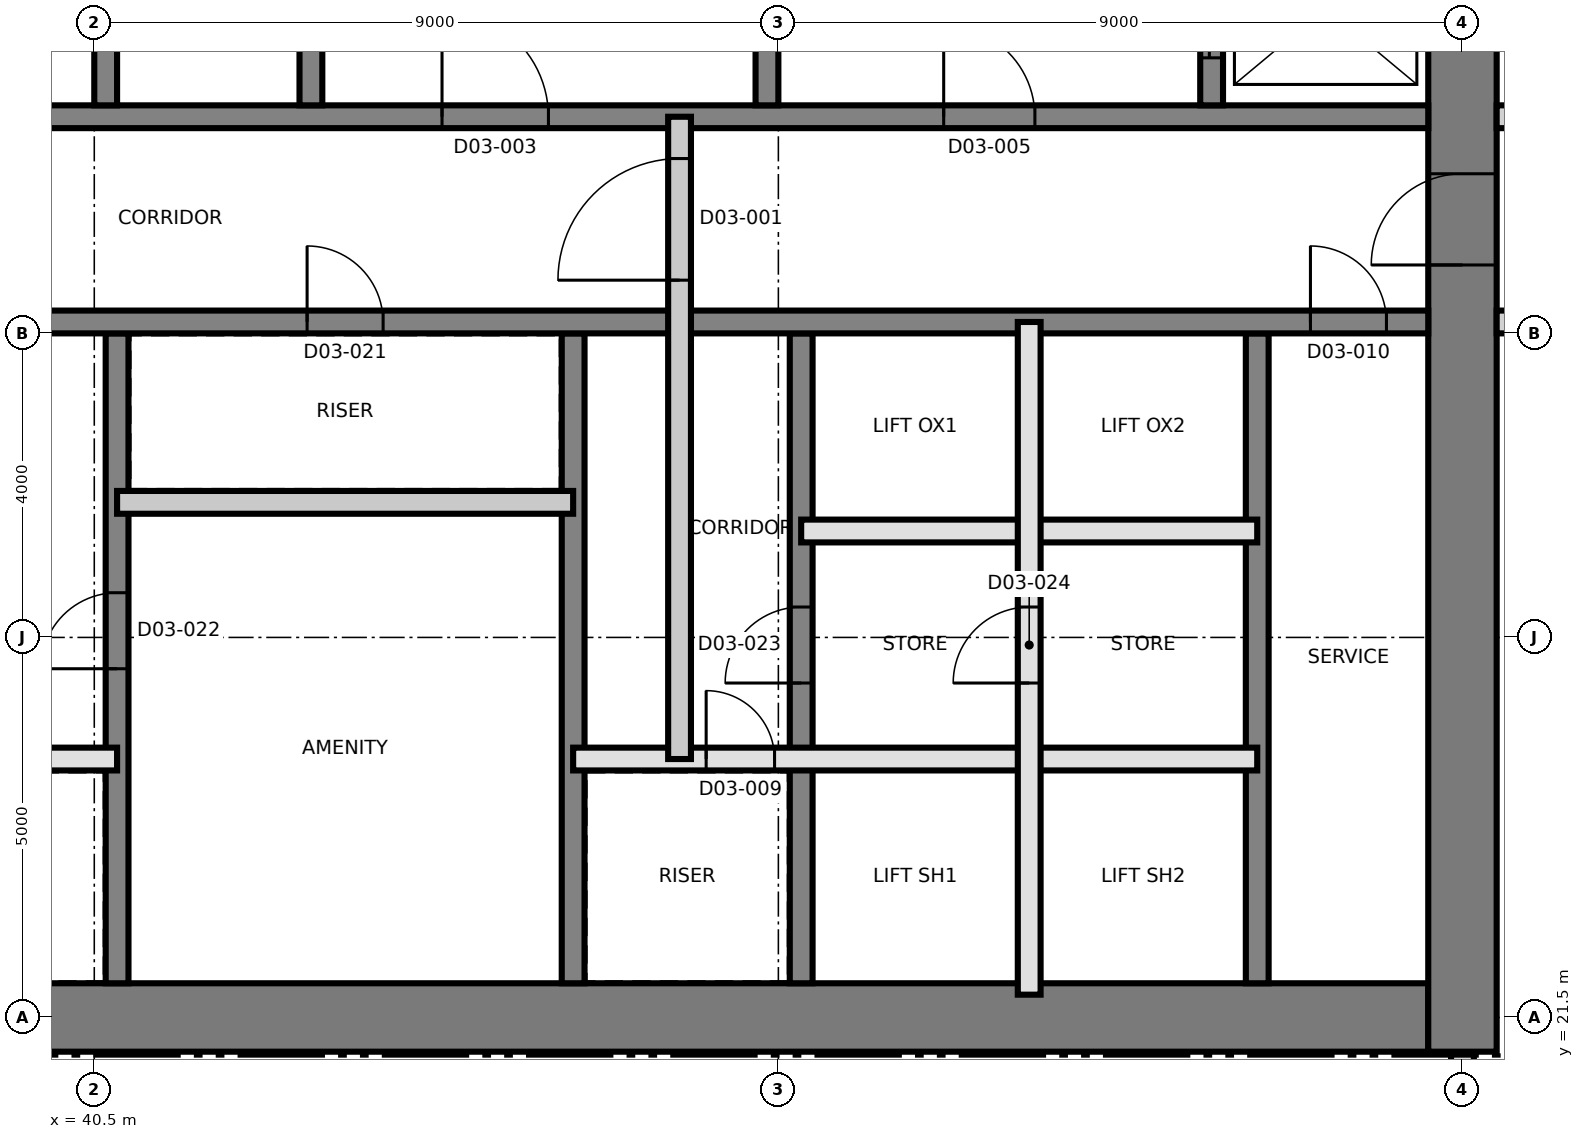
"""IFC4 building model, lengths in metres.
Left out: names, types, materials, properties, quantities, classifications, styles, units other than length and angle.
Written with IfcOpenShell. Run it as: python <this file> out.ifc"""

import sys

from ifc_helpers import new_model, si_unit, direction, frame, frame_2d, origin, place, context, subcontext, project, spatial, rectangle, extrude, element, fill, save


model = new_model("IFC4")
c1 = context("Model", 3, precision=1e-05, world=origin(), true_north=direction((0.0, 1.0)))
c2 = subcontext(c1, "Body", "Model", "MODEL_VIEW")
j1 = project(units=[si_unit("LENGTHUNIT", "METRE"), si_unit("PLANEANGLEUNIT", "RADIAN")], contexts=[c1])
p1 = place(None, origin())
s1 = spatial("IfcSite", under=j1, at=p1, CompositionType="ELEMENT")
p2 = place(p1, origin())
s2 = spatial("IfcBuilding", under=s1, at=p2, CompositionType="ELEMENT")
p3 = place(p2, frame((0.0, 0.0, 55.7)))
s3 = spatial("IfcBuildingStorey", under=s2, at=p3, CompositionType="ELEMENT", Elevation=55.7)
p4 = place(p3, frame((31.05, 21.5, 0.0), z_axis=(0.0, 0.0, 1.0), x_axis=(1.0, 0.0, 0.0)))
e1 = element("IfcWall", 1, at=p4, inside=s3, PredefinedType="SHEAR", context=c2, shape_type="SweptSolid", body=[
    extrude(rectangle(XDim=27.0, YDim=0.9, at=frame_2d((13.5, 0.0))), origin(), (0.0, 0.0, 1.0), 3.7),
])
p5 = place(p3, frame((58.5, 21.05, 0.0), z_axis=(0.0, 0.0, 1.0), x_axis=(0.0, 1.0, 0.0)))
e2 = element("IfcWall", 2, at=p5, inside=s3, PredefinedType="SHEAR", context=c2, shape_type="SweptSolid", body=[
    extrude(rectangle(XDim=18.9, YDim=0.9, at=frame_2d((9.45, 0.0))), origin(), (0.0, 0.0, 1.0), 3.7),
])
p6 = place(p5, frame((10.35, 0.0, 0.0)))
e3 = element("IfcOpeningElement", 3, at=p6, cuts=e2, PredefinedType="OPENING", context=c2, shape_type="SweptSolid", body=[
    extrude(rectangle(XDim=1.2, YDim=2.1, at=frame_2d((0.6, 1.05))), frame((0.0, 0.46, 0.0), z_axis=(0.0, -1.0, 0.0), x_axis=(1.0, 0.0, 0.0)), (0.0, 0.0, 1.0), 0.92),
])
p7 = place(p3, frame((40.8, 21.95, 0.0), z_axis=(0.0, 0.0, 1.0), x_axis=(0.0, 1.0, 0.0)))
e4 = element("IfcWall", 4, at=p7, inside=s3, PredefinedType="SHEAR", context=c2, shape_type="SweptSolid", body=[
    extrude(rectangle(XDim=8.55, YDim=0.3, at=frame_2d((4.275, 0.0))), origin(), (0.0, 0.0, 1.0), 3.7),
])
p8 = place(p7, frame((4.138, 0.0, 0.0)))
e5 = element("IfcOpeningElement", 5, at=p8, cuts=e4, PredefinedType="OPENING", context=c2, shape_type="SweptSolid", body=[
    extrude(rectangle(XDim=1.0, YDim=2.1, at=frame_2d((0.5, 1.05))), frame((0.0, 0.16, 0.0), z_axis=(0.0, -1.0, 0.0), x_axis=(1.0, 0.0, 0.0)), (0.0, 0.0, 1.0), 0.32),
])
p9 = place(p3, frame((46.8, 21.95, 0.0), z_axis=(0.0, 0.0, 1.0), x_axis=(0.0, 1.0, 0.0)))
e6 = element("IfcWall", 6, at=p9, inside=s3, PredefinedType="SHEAR", context=c2, shape_type="SweptSolid", body=[
    extrude(rectangle(XDim=8.55, YDim=0.3, at=frame_2d((4.275, 0.0))), origin(), (0.0, 0.0, 1.0), 3.7),
])
p10 = place(p3, frame((49.8, 21.95, 0.0), z_axis=(0.0, 0.0, 1.0), x_axis=(0.0, 1.0, 0.0)))
e7 = element("IfcWall", 7, at=p10, inside=s3, PredefinedType="SHEAR", context=c2, shape_type="SweptSolid", body=[
    extrude(rectangle(XDim=8.55, YDim=0.3, at=frame_2d((4.275, 0.0))), origin(), (0.0, 0.0, 1.0), 3.7),
])
p11 = place(p10, frame((3.95, 0.0, 0.0)))
e8 = element("IfcOpeningElement", 8, at=p11, cuts=e7, PredefinedType="OPENING", context=c2, shape_type="SweptSolid", body=[
    extrude(rectangle(XDim=1.0, YDim=2.1, at=frame_2d((0.5, 1.05))), frame((0.0, 0.16, 0.0), z_axis=(0.0, -1.0, 0.0), x_axis=(1.0, 0.0, 0.0)), (0.0, 0.0, 1.0), 0.32),
])
p12 = place(p3, frame((55.8, 21.95, 0.0), z_axis=(0.0, 0.0, 1.0), x_axis=(0.0, 1.0, 0.0)))
e9 = element("IfcWall", 9, at=p12, inside=s3, PredefinedType="SHEAR", context=c2, shape_type="SweptSolid", body=[
    extrude(rectangle(XDim=8.55, YDim=0.3, at=frame_2d((4.275, 0.0))), origin(), (0.0, 0.0, 1.0), 3.7),
])
p13 = place(p3, frame((31.95, 30.65, 0.0), z_axis=(0.0, 0.0, 1.0), x_axis=(1.0, 0.0, 0.0)))
e10 = element("IfcWall", 10, at=p13, inside=s3, PredefinedType="SHEAR", context=c2, shape_type="SweptSolid", body=[
    extrude(rectangle(XDim=26.1, YDim=0.3, at=frame_2d((13.05, 0.0))), origin(), (0.0, 0.0, 1.0), 3.7),
])
p14 = place(p13, frame((24.55, 0.0, 0.0)))
e11 = element("IfcOpeningElement", 11, at=p14, cuts=e10, PredefinedType="OPENING", context=c2, shape_type="SweptSolid", body=[
    extrude(rectangle(XDim=1.0, YDim=2.1, at=frame_2d((0.5, 1.05))), frame((0.0, 0.16, 0.0), z_axis=(0.0, -1.0, 0.0), x_axis=(1.0, 0.0, 0.0)), (0.0, 0.0, 1.0), 0.32),
])
p15 = place(p13, frame((11.35, 0.0, 0.0)))
e12 = element("IfcOpeningElement", 12, at=p15, cuts=e10, PredefinedType="OPENING", context=c2, shape_type="SweptSolid", body=[
    extrude(rectangle(XDim=1.0, YDim=2.1, at=frame_2d((0.5, 1.05))), frame((0.0, 0.16, 0.0), z_axis=(0.0, -1.0, 0.0), x_axis=(1.0, 0.0, 0.0)), (0.0, 0.0, 1.0), 0.32),
])
p16 = place(p3, frame((31.95, 33.35, 0.0), z_axis=(0.0, 0.0, 1.0), x_axis=(1.0, 0.0, 0.0)))
e13 = element("IfcWall", 13, at=p16, inside=s3, PredefinedType="SHEAR", context=c2, shape_type="SweptSolid", body=[
    extrude(rectangle(XDim=26.1, YDim=0.3, at=frame_2d((13.05, 0.0))), origin(), (0.0, 0.0, 1.0), 3.7),
])
p17 = place(p16, frame((13.125, 0.0, 0.0)))
e14 = element("IfcOpeningElement", 14, at=p17, cuts=e13, PredefinedType="OPENING", context=c2, shape_type="SweptSolid", body=[
    extrude(rectangle(XDim=1.4, YDim=2.1, at=frame_2d((0.7, 1.05))), frame((0.0, 0.16, 0.0), z_axis=(0.0, -1.0, 0.0), x_axis=(1.0, 0.0, 0.0)), (0.0, 0.0, 1.0), 0.32),
])
p18 = place(p16, frame((5.175, 0.0, 0.0)))
e15 = element("IfcOpeningElement", 15, at=p18, cuts=e13, PredefinedType="OPENING", context=c2, shape_type="SweptSolid", body=[
    extrude(rectangle(XDim=1.2, YDim=2.1, at=frame_2d((0.6, 1.05))), frame((0.0, 0.16, 0.0), z_axis=(0.0, -1.0, 0.0), x_axis=(1.0, 0.0, 0.0)), (0.0, 0.0, 1.0), 0.32),
])
p19 = place(p16, frame((19.725, 0.0, 0.0)))
e16 = element("IfcOpeningElement", 16, at=p19, cuts=e13, PredefinedType="OPENING", context=c2, shape_type="SweptSolid", body=[
    extrude(rectangle(XDim=1.2, YDim=2.1, at=frame_2d((0.6, 1.05))), frame((0.0, 0.16, 0.0), z_axis=(0.0, -1.0, 0.0), x_axis=(1.0, 0.0, 0.0)), (0.0, 0.0, 1.0), 0.32),
])
for number, where, z_axis, x_axis in (
    (17, (40.65, 33.5, 0.0), (0.0, 0.0, 1.0), (0.0, 1.0, 0.0)),
    (18, (43.35, 33.5, 0.0), (0.0, 0.0, 1.0), (0.0, 1.0, 0.0)),
    (19, (49.35, 33.5, 0.0), (0.0, 0.0, 1.0), (0.0, 1.0, 0.0)),
):
    element("IfcWall", number, at=place(p3, frame(where, z_axis=z_axis, x_axis=x_axis)), inside=s3, PredefinedType="SHEAR", context=c2, shape_type="SweptSolid", body=[
        extrude(rectangle(XDim=5.55, YDim=0.3, at=frame_2d((2.775, 0.0))), origin(), (0.0, 0.0, 1.0), 3.7),
    ])
p20 = place(p3, frame((55.2, 33.5, 0.0), z_axis=(0.0, 0.0, 1.0), x_axis=(0.0, 1.0, 0.0)))
e20 = element("IfcWall", 20, at=p20, inside=s3, PredefinedType="SHEAR", context=c2, shape_type="SweptSolid", body=[
    extrude(rectangle(XDim=2.55, YDim=0.3, at=frame_2d((1.275, 0.0))), origin(), (0.0, 0.0, 1.0), 3.7),
])
p21 = place(p20, frame((0.625, 0.0, 0.0)))
e21 = element("IfcOpeningElement", 21, at=p21, cuts=e20, PredefinedType="OPENING", context=c2, shape_type="SweptSolid", body=[
    extrude(rectangle(XDim=1.3, YDim=2.4, at=frame_2d((0.65, 1.2))), frame((0.0, 0.16, 0.0), z_axis=(0.0, -1.0, 0.0), x_axis=(1.0, 0.0, 0.0)), (0.0, 0.0, 1.0), 0.32),
])
p22 = place(p3, frame((31.8, 24.9, 0.0), z_axis=(0.0, 0.0, 1.0), x_axis=(1.0, 0.0, 0.0)))
e22 = element("IfcWall", 22, at=p22, inside=s3, PredefinedType="SOLIDWALL", context=c2, shape_type="SweptSolid", body=[
    extrude(rectangle(XDim=9.0, YDim=0.3, at=frame_2d((4.5, 0.0))), origin(), (0.0, 0.0, 1.0), 3.4),
])
p23 = place(p22, frame((7.05, 0.0, 0.0)))
e23 = element("IfcOpeningElement", 23, at=p23, cuts=e22, PredefinedType="OPENING", context=c2, shape_type="SweptSolid", body=[
    extrude(rectangle(XDim=0.9, YDim=2.1, at=frame_2d((0.45, 1.05))), frame((0.0, 0.16, 0.0), z_axis=(0.0, -1.0, 0.0), x_axis=(1.0, 0.0, 0.0)), (0.0, 0.0, 1.0), 0.32),
])
p24 = place(p22, frame((0.95, 0.0, 0.0)))
e24 = element("IfcOpeningElement", 24, at=p24, cuts=e22, PredefinedType="OPENING", context=c2, shape_type="SweptSolid", body=[
    extrude(rectangle(XDim=1.1, YDim=2.4, at=frame_2d((0.55, 1.2))), frame((0.0, 0.16, 0.0), z_axis=(0.0, -1.0, 0.0), x_axis=(1.0, 0.0, 0.0)), (0.0, 0.0, 1.0), 0.32),
])
p25 = place(p22, frame((3.95, 0.0, 0.0)))
e25 = element("IfcOpeningElement", 25, at=p25, cuts=e22, PredefinedType="OPENING", context=c2, shape_type="SweptSolid", body=[
    extrude(rectangle(XDim=1.1, YDim=2.4, at=frame_2d((0.55, 1.2))), frame((0.0, 0.16, 0.0), z_axis=(0.0, -1.0, 0.0), x_axis=(1.0, 0.0, 0.0)), (0.0, 0.0, 1.0), 0.32),
])
p26 = place(p3, frame((46.8, 24.9, 0.0), z_axis=(0.0, 0.0, 1.0), x_axis=(1.0, 0.0, 0.0)))
e26 = element("IfcWall", 26, at=p26, inside=s3, PredefinedType="SOLIDWALL", context=c2, shape_type="SweptSolid", body=[
    extrude(rectangle(XDim=9.0, YDim=0.3, at=frame_2d((4.5, 0.0))), origin(), (0.0, 0.0, 1.0), 3.4),
])
p27 = place(p26, frame((1.75, 0.0, 0.0)))
e27 = element("IfcOpeningElement", 27, at=p27, cuts=e26, PredefinedType="OPENING", context=c2, shape_type="SweptSolid", body=[
    extrude(rectangle(XDim=0.9, YDim=2.1, at=frame_2d((0.45, 1.05))), frame((0.0, 0.16, 0.0), z_axis=(0.0, -1.0, 0.0), x_axis=(1.0, 0.0, 0.0)), (0.0, 0.0, 1.0), 0.32),
])
p28 = place(p3, frame((49.8, 27.9, 0.0), z_axis=(0.0, 0.0, 1.0), x_axis=(1.0, 0.0, 0.0)))
e28 = element("IfcWall", 28, at=p28, inside=s3, PredefinedType="SOLIDWALL", context=c2, shape_type="SweptSolid", body=[
    extrude(rectangle(XDim=6.0, YDim=0.3, at=frame_2d((3.0, 0.0))), origin(), (0.0, 0.0, 1.0), 3.4),
])
p29 = place(p3, frame((40.8, 28.277, 0.0), z_axis=(0.0, 0.0, 1.0), x_axis=(1.0, 0.0, 0.0)))
e29 = element("IfcWall", 29, at=p29, inside=s3, PredefinedType="PARTITIONING", context=c2, shape_type="SweptSolid", body=[
    extrude(rectangle(XDim=6.0, YDim=0.3, at=frame_2d((3.0, 0.0))), origin(), (0.0, 0.0, 1.0), 3.4),
])
p30 = place(p3, frame((48.2, 24.9, 0.0), z_axis=(0.0, 0.0, 1.0), x_axis=(0.0, 1.0, 0.0)))
e30 = element("IfcWall", 30, at=p30, inside=s3, PredefinedType="PARTITIONING", context=c2, shape_type="SweptSolid", body=[
    extrude(rectangle(XDim=8.45, YDim=0.3, at=frame_2d((4.225, 0.0))), origin(), (0.0, 0.0, 1.0), 3.4),
])
p31 = place(p30, frame((6.3, 0.0, 0.0)))
e31 = element("IfcOpeningElement", 31, at=p31, cuts=e30, PredefinedType="OPENING", context=c2, shape_type="SweptSolid", body=[
    extrude(rectangle(XDim=1.6, YDim=2.1, at=frame_2d((0.8, 1.05))), frame((0.0, 0.16, 0.0), z_axis=(0.0, -1.0, 0.0), x_axis=(1.0, 0.0, 0.0)), (0.0, 0.0, 1.0), 0.32),
])
p32 = place(p3, frame((52.8, 21.8, 0.0), z_axis=(0.0, 0.0, 1.0), x_axis=(0.0, 1.0, 0.0)))
e32 = element("IfcWall", 32, at=p32, inside=s3, PredefinedType="SOLIDWALL", context=c2, shape_type="SweptSolid", body=[
    extrude(rectangle(XDim=8.85, YDim=0.3, at=frame_2d((4.425, 0.0))), origin(), (0.0, 0.0, 1.0), 3.4),
])
p33 = place(p32, frame((4.1, 0.0, 0.0)))
e33 = element("IfcOpeningElement", 33, at=p33, cuts=e32, PredefinedType="OPENING", context=c2, shape_type="SweptSolid", body=[
    extrude(rectangle(XDim=1.0, YDim=2.1, at=frame_2d((0.5, 1.05))), frame((0.0, 0.16, 0.0), z_axis=(0.0, -1.0, 0.0), x_axis=(1.0, 0.0, 0.0)), (0.0, 0.0, 1.0), 0.32),
])
p34 = place(p3, frame((58.95, 30.65, 0.0), z_axis=(0.0, 0.0, 1.0), x_axis=(1.0, 0.0, 0.0)))
e34 = element("IfcWall", 34, at=p34, inside=s3, PredefinedType="PARTITIONING", context=c2, shape_type="SweptSolid", body=[
    extrude(rectangle(XDim=26.38, YDim=0.3, at=frame_2d((13.19, 0.0))), origin(), (0.0, 0.0, 1.0), 3.4),
])
p35 = place(p34, frame((0.685, 0.0, 0.0)))
e35 = element("IfcOpeningElement", 35, at=p35, cuts=e34, PredefinedType="OPENING", context=c2, shape_type="SweptSolid", body=[
    extrude(rectangle(XDim=1.2, YDim=2.1, at=frame_2d((0.6, 1.05))), frame((0.0, 0.16, 0.0), z_axis=(0.0, -1.0, 0.0), x_axis=(1.0, 0.0, 0.0)), (0.0, 0.0, 1.0), 0.32),
])
p36 = place(p34, frame((3.935, 0.0, 0.0)))
e36 = element("IfcOpeningElement", 36, at=p36, cuts=e34, PredefinedType="OPENING", context=c2, shape_type="SweptSolid", body=[
    extrude(rectangle(XDim=1.0, YDim=2.1, at=frame_2d((0.5, 1.05))), frame((0.0, 0.16, 0.0), z_axis=(0.0, -1.0, 0.0), x_axis=(1.0, 0.0, 0.0)), (0.0, 0.0, 1.0), 0.32),
])
p37 = place(p34, frame((9.685, 0.0, 0.0)))
e37 = element("IfcOpeningElement", 37, at=p37, cuts=e34, PredefinedType="OPENING", context=c2, shape_type="SweptSolid", body=[
    extrude(rectangle(XDim=1.2, YDim=2.1, at=frame_2d((0.6, 1.05))), frame((0.0, 0.16, 0.0), z_axis=(0.0, -1.0, 0.0), x_axis=(1.0, 0.0, 0.0)), (0.0, 0.0, 1.0), 0.32),
])
p38 = place(p34, frame((12.935, 0.0, 0.0)))
e38 = element("IfcOpeningElement", 38, at=p38, cuts=e34, PredefinedType="OPENING", context=c2, shape_type="SweptSolid", body=[
    extrude(rectangle(XDim=1.0, YDim=2.1, at=frame_2d((0.5, 1.05))), frame((0.0, 0.16, 0.0), z_axis=(0.0, -1.0, 0.0), x_axis=(1.0, 0.0, 0.0)), (0.0, 0.0, 1.0), 0.32),
])
p39 = place(p34, frame((21.55, 0.0, 0.0)))
e39 = element("IfcOpeningElement", 39, at=p39, cuts=e34, PredefinedType="OPENING", context=c2, shape_type="SweptSolid", body=[
    extrude(rectangle(XDim=1.0, YDim=2.4, at=frame_2d((0.5, 1.2))), frame((0.0, 0.16, 0.0), z_axis=(0.0, -1.0, 0.0), x_axis=(1.0, 0.0, 0.0)), (0.0, 0.0, 1.0), 0.32),
])
p40 = place(p3, frame((58.95, 33.35, 0.0), z_axis=(0.0, 0.0, 1.0), x_axis=(1.0, 0.0, 0.0)))
e40 = element("IfcWall", 40, at=p40, inside=s3, PredefinedType="PARTITIONING", context=c2, shape_type="SweptSolid", body=[
    extrude(rectangle(XDim=26.38, YDim=0.3, at=frame_2d((13.19, 0.0))), origin(), (0.0, 0.0, 1.0), 3.4),
])
p41 = place(p40, frame((0.685, 0.0, 0.0)))
e41 = element("IfcOpeningElement", 41, at=p41, cuts=e40, PredefinedType="OPENING", context=c2, shape_type="SweptSolid", body=[
    extrude(rectangle(XDim=1.2, YDim=2.1, at=frame_2d((0.6, 1.05))), frame((0.0, 0.16, 0.0), z_axis=(0.0, -1.0, 0.0), x_axis=(1.0, 0.0, 0.0)), (0.0, 0.0, 1.0), 0.32),
])
p42 = place(p40, frame((3.935, 0.0, 0.0)))
e42 = element("IfcOpeningElement", 42, at=p42, cuts=e40, PredefinedType="OPENING", context=c2, shape_type="SweptSolid", body=[
    extrude(rectangle(XDim=1.0, YDim=2.1, at=frame_2d((0.5, 1.05))), frame((0.0, 0.16, 0.0), z_axis=(0.0, -1.0, 0.0), x_axis=(1.0, 0.0, 0.0)), (0.0, 0.0, 1.0), 0.32),
])
p43 = place(p40, frame((14.2, 0.0, 0.0)))
e43 = element("IfcOpeningElement", 43, at=p43, cuts=e40, PredefinedType="OPENING", context=c2, shape_type="SweptSolid", body=[
    extrude(rectangle(XDim=1.0, YDim=2.4, at=frame_2d((0.5, 1.2))), frame((0.0, 0.16, 0.0), z_axis=(0.0, -1.0, 0.0), x_axis=(1.0, 0.0, 0.0)), (0.0, 0.0, 1.0), 0.32),
])
p44 = place(p40, frame((19.25, 0.0, 0.0)))
e44 = element("IfcOpeningElement", 44, at=p44, cuts=e40, PredefinedType="OPENING", context=c2, shape_type="SweptSolid", body=[
    extrude(rectangle(XDim=1.2, YDim=2.1, at=frame_2d((0.6, 1.05))), frame((0.0, 0.16, 0.0), z_axis=(0.0, -1.0, 0.0), x_axis=(1.0, 0.0, 0.0)), (0.0, 0.0, 1.0), 0.32),
])
p45 = place(p40, frame((22.5, 0.0, 0.0)))
e45 = element("IfcOpeningElement", 45, at=p45, cuts=e40, PredefinedType="OPENING", context=c2, shape_type="SweptSolid", body=[
    extrude(rectangle(XDim=1.0, YDim=2.1, at=frame_2d((0.5, 1.05))), frame((0.0, 0.16, 0.0), z_axis=(0.0, -1.0, 0.0), x_axis=(1.0, 0.0, 0.0)), (0.0, 0.0, 1.0), 0.32),
])
p46 = place(p3, frame((58.5, 19.705, 0.0), z_axis=(0.0, 0.0, 1.0), x_axis=(0.0, 1.0, 0.0)))
e46 = element("IfcWall", 46, at=p46, inside=s3, PredefinedType="PARTITIONING", context=c2, shape_type="SweptSolid", body=[
    extrude(rectangle(XDim=1.325, YDim=0.3, at=frame_2d((0.663, 0.0))), origin(), (0.0, 0.0, 1.0), 3.4),
])
p47 = place(p31, origin())
e47 = element("IfcDoor", 47, at=p47, inside=s3, OperationType="SINGLE_SWING_LEFT", PredefinedType="DOOR", context=c2, shape_type="SweptSolid", body=[
    extrude(rectangle(XDim=1.6, YDim=2.1, at=frame_2d((0.8, 1.05))), frame((0.0, 0.025, 0.0), z_axis=(0.0, -1.0, 0.0), x_axis=(1.0, 0.0, 0.0)), (0.0, 0.0, 1.0), 0.05),
])
fill(e31, e47)
p48 = place(p17, origin())
e48 = element("IfcDoor", 48, at=p48, inside=s3, OperationType="SINGLE_SWING_RIGHT", PredefinedType="DOOR", context=c2, shape_type="SweptSolid", body=[
    extrude(rectangle(XDim=1.4, YDim=2.1, at=frame_2d((0.7, 1.05))), frame((0.0, 0.025, 0.0), z_axis=(0.0, -1.0, 0.0), x_axis=(1.0, 0.0, 0.0)), (0.0, 0.0, 1.0), 0.05),
])
fill(e14, e48)
p49 = place(p19, origin())
e49 = element("IfcDoor", 49, at=p49, inside=s3, OperationType="SINGLE_SWING_RIGHT", PredefinedType="DOOR", context=c2, shape_type="SweptSolid", body=[
    extrude(rectangle(XDim=1.2, YDim=2.1, at=frame_2d((0.6, 1.05))), frame((0.0, 0.025, 0.0), z_axis=(0.0, -1.0, 0.0), x_axis=(1.0, 0.0, 0.0)), (0.0, 0.0, 1.0), 0.05),
])
fill(e16, e49)
p50 = place(p27, origin())
e50 = element("IfcDoor", 50, at=p50, inside=s3, OperationType="SINGLE_SWING_RIGHT", PredefinedType="DOOR", context=c2, shape_type="SweptSolid", body=[
    extrude(rectangle(XDim=0.9, YDim=2.1, at=frame_2d((0.45, 1.05))), frame((0.0, 0.025, 0.0), z_axis=(0.0, -1.0, 0.0), x_axis=(1.0, 0.0, 0.0)), (0.0, 0.0, 1.0), 0.05),
])
fill(e27, e50)
p51 = place(p14, origin())
e51 = element("IfcDoor", 51, at=p51, inside=s3, OperationType="SINGLE_SWING_LEFT", PredefinedType="DOOR", context=c2, shape_type="SweptSolid", body=[
    extrude(rectangle(XDim=1.0, YDim=2.1, at=frame_2d((0.5, 1.05))), frame((0.0, 0.025, 0.0), z_axis=(0.0, -1.0, 0.0), x_axis=(1.0, 0.0, 0.0)), (0.0, 0.0, 1.0), 0.05),
])
fill(e11, e51)
p52 = place(p6, origin())
e52 = element("IfcDoor", 52, at=p52, inside=s3, OperationType="SINGLE_SWING_LEFT", PredefinedType="DOOR", context=c2, shape_type="SweptSolid", body=[
    extrude(rectangle(XDim=1.2, YDim=2.1, at=frame_2d((0.6, 1.05))), frame((0.0, 0.025, 0.0), z_axis=(0.0, -1.0, 0.0), x_axis=(1.0, 0.0, 0.0)), (0.0, 0.0, 1.0), 0.05),
])
fill(e3, e52)
p53 = place(p21, origin())
e53 = element("IfcDoor", 53, at=p53, inside=s3, OperationType="SLIDING_TO_LEFT", PredefinedType="DOOR", context=c2, shape_type="SweptSolid", body=[
    extrude(rectangle(XDim=1.3, YDim=2.4, at=frame_2d((0.65, 1.2))), frame((0.0, 0.025, 0.0), z_axis=(0.0, -1.0, 0.0), x_axis=(1.0, 0.0, 0.0)), (0.0, 0.0, 1.0), 0.05),
])
fill(e21, e53)
p54 = place(p15, origin())
e54 = element("IfcDoor", 54, at=p54, inside=s3, OperationType="SINGLE_SWING_LEFT", PredefinedType="DOOR", context=c2, shape_type="SweptSolid", body=[
    extrude(rectangle(XDim=1.0, YDim=2.1, at=frame_2d((0.5, 1.05))), frame((0.0, 0.025, 0.0), z_axis=(0.0, -1.0, 0.0), x_axis=(1.0, 0.0, 0.0)), (0.0, 0.0, 1.0), 0.05),
])
fill(e12, e54)
p55 = place(p8, origin())
e55 = element("IfcDoor", 55, at=p55, inside=s3, OperationType="SINGLE_SWING_RIGHT", PredefinedType="DOOR", context=c2, shape_type="SweptSolid", body=[
    extrude(rectangle(XDim=1.0, YDim=2.1, at=frame_2d((0.5, 1.05))), frame((0.0, 0.025, 0.0), z_axis=(0.0, -1.0, 0.0), x_axis=(1.0, 0.0, 0.0)), (0.0, 0.0, 1.0), 0.05),
])
fill(e5, e55)
p56 = place(p11, origin())
e56 = element("IfcDoor", 56, at=p56, inside=s3, OperationType="SINGLE_SWING_LEFT", PredefinedType="DOOR", context=c2, shape_type="SweptSolid", body=[
    extrude(rectangle(XDim=1.0, YDim=2.1, at=frame_2d((0.5, 1.05))), frame((0.0, 0.025, 0.0), z_axis=(0.0, -1.0, 0.0), x_axis=(1.0, 0.0, 0.0)), (0.0, 0.0, 1.0), 0.05),
])
fill(e8, e56)
p57 = place(p33, origin())
e57 = element("IfcDoor", 57, at=p57, inside=s3, OperationType="SINGLE_SWING_RIGHT", PredefinedType="DOOR", context=c2, shape_type="SweptSolid", body=[
    extrude(rectangle(XDim=1.0, YDim=2.1, at=frame_2d((0.5, 1.05))), frame((0.0, 0.025, 0.0), z_axis=(0.0, -1.0, 0.0), x_axis=(1.0, 0.0, 0.0)), (0.0, 0.0, 1.0), 0.05),
])
fill(e33, e57)
save(model, sys.argv[1])
